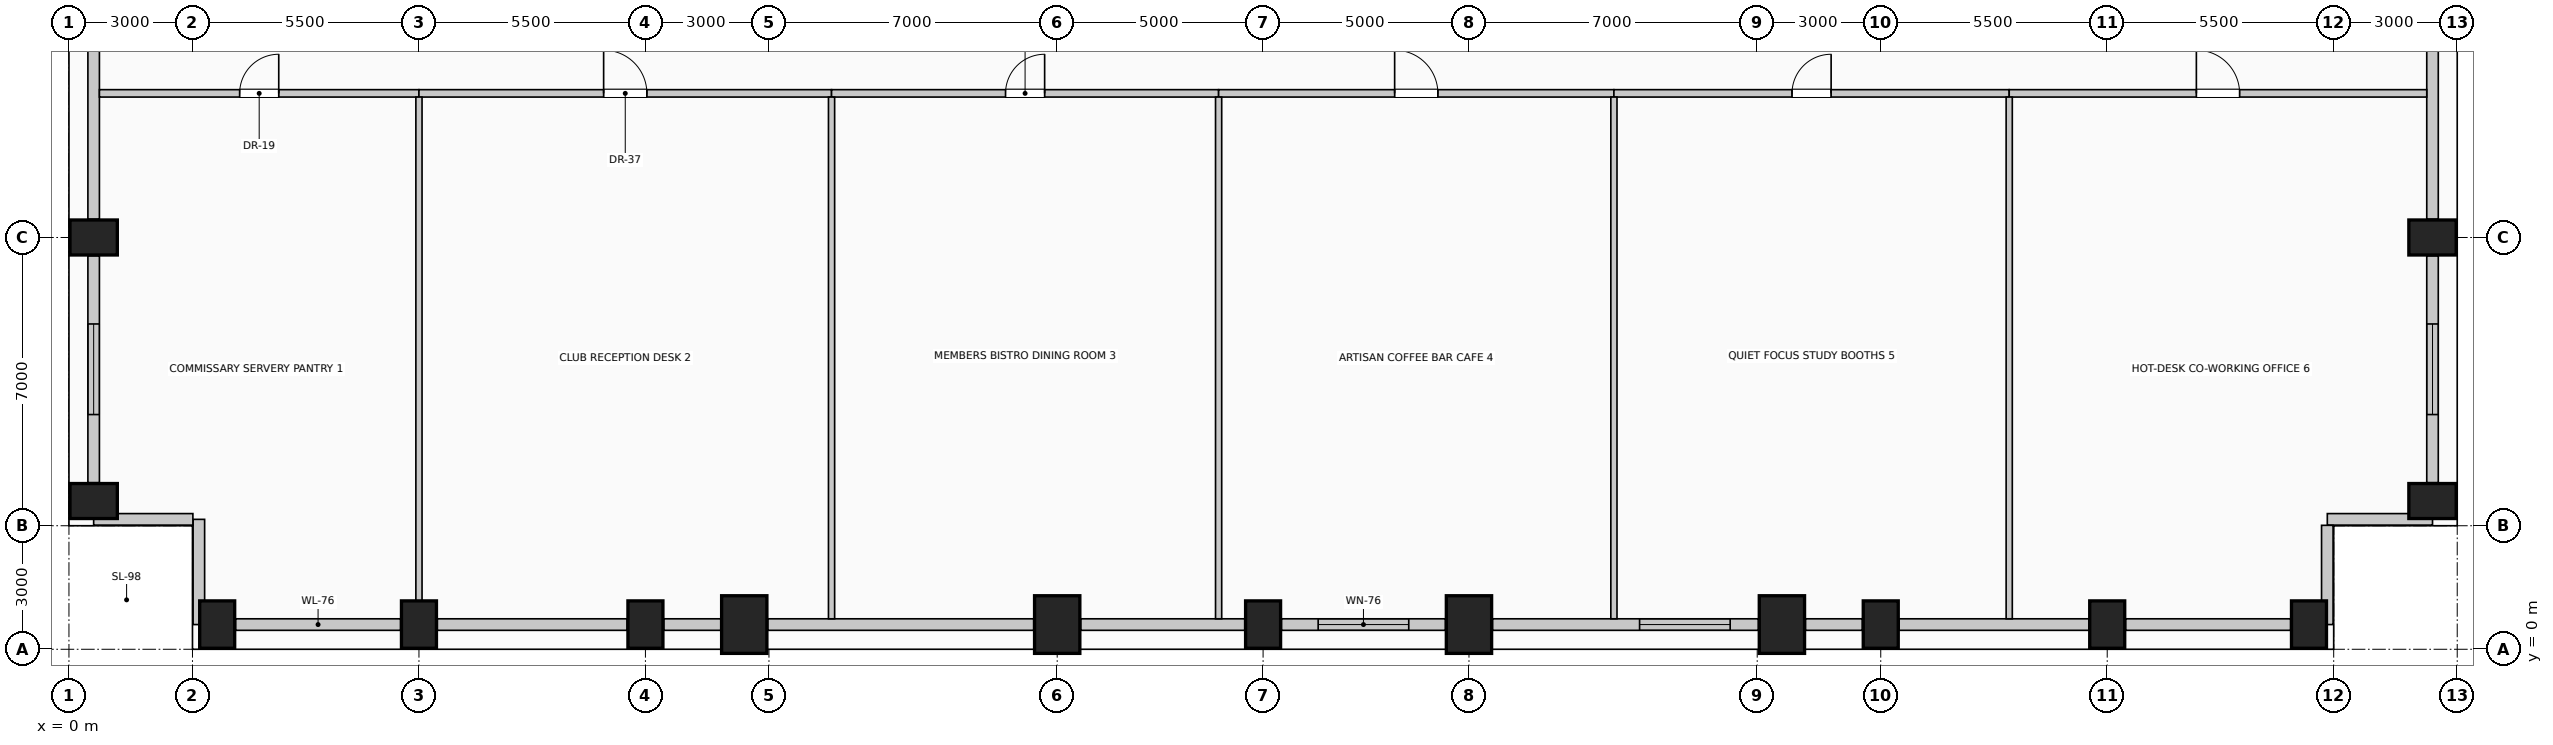
"""IFC4 building model, lengths in metres.
Left out: names, types, materials, properties, quantities, classifications, styles, units other than length and angle.
Written with IfcOpenShell. Run it as: python <this file> out.ifc"""

import sys

from ifc_helpers import new_model, si_unit, direction, frame, frame_2d, origin, origin_2d, place, context, subcontext, project, spatial, rectangle, extrude, element, fill, save


model = new_model("IFC4")
c1 = context("Model", 3, precision=1e-05, world=origin(), true_north=direction((0.0, 1.0)))
c2 = subcontext(c1, "Body", "Model", "MODEL_VIEW")
j1 = project(units=[si_unit("LENGTHUNIT", "METRE"), si_unit("PLANEANGLEUNIT", "RADIAN")], contexts=[c1])
p1 = place(None, origin())
s1 = spatial("IfcSite", under=j1, at=p1, CompositionType="ELEMENT")
p2 = place(p1, origin())
s2 = spatial("IfcBuilding", under=s1, at=p2, CompositionType="ELEMENT")
p3 = place(p2, frame((0.0, 0.0, 100.6)))
s3 = spatial("IfcBuildingStorey", under=s2, at=p3, CompositionType="ELEMENT", Elevation=100.6)
for number, where, z_axis, x_axis in (
    (1, (3.6, 0.6, 0.0), (0.0, 0.0, 1.0), (1.0, 0.0, 0.0)),
    (2, (8.5, 0.6, 0.0), (0.0, 0.0, 1.0), (1.0, 0.0, 0.0)),
    (3, (14.0, 0.6, 0.0), (0.0, 0.0, 1.0), (1.0, 0.0, 0.0)),
):
    element("IfcColumn", number, at=place(p3, frame(where, z_axis=z_axis, x_axis=x_axis)), inside=s3, PredefinedType="COLUMN", context=c2, shape_type="SweptSolid", body=[
        extrude(rectangle(XDim=0.85, YDim=1.15, at=origin_2d()), origin(), (0.0, 0.0, 1.0), 4.0),
    ])
for number, where, z_axis, x_axis in (
    (4, (16.4, 0.6, 0.0), (0.0, 0.0, 1.0), (1.0, 0.0, 0.0)),
    (5, (24.0, 0.6, 0.0), (0.0, 0.0, 1.0), (1.0, 0.0, 0.0)),
):
    element("IfcColumn", number, at=place(p3, frame(where, z_axis=z_axis, x_axis=x_axis)), inside=s3, PredefinedType="COLUMN", context=c2, shape_type="SweptSolid", body=[
        extrude(rectangle(XDim=1.1, YDim=1.4, at=origin_2d()), origin(), (0.0, 0.0, 1.0), 4.0),
    ])
p4 = place(p3, frame((29.0, 0.6, 0.0), z_axis=(0.0, 0.0, 1.0), x_axis=(1.0, 0.0, 0.0)))
e6 = element("IfcColumn", 6, at=p4, inside=s3, PredefinedType="COLUMN", context=c2, shape_type="SweptSolid", body=[
    extrude(rectangle(XDim=0.85, YDim=1.15, at=origin_2d()), origin(), (0.0, 0.0, 1.0), 4.0),
])
for number, where, z_axis, x_axis in (
    (7, (34.0, 0.6, 0.0), (0.0, 0.0, 1.0), (1.0, 0.0, 0.0)),
    (8, (41.6, 0.6, 0.0), (0.0, 0.0, 1.0), (1.0, 0.0, 0.0)),
):
    element("IfcColumn", number, at=place(p3, frame(where, z_axis=z_axis, x_axis=x_axis)), inside=s3, PredefinedType="COLUMN", context=c2, shape_type="SweptSolid", body=[
        extrude(rectangle(XDim=1.1, YDim=1.4, at=origin_2d()), origin(), (0.0, 0.0, 1.0), 4.0),
    ])
for number, where, z_axis, x_axis in (
    (9, (44.0, 0.6, 0.0), (0.0, 0.0, 1.0), (1.0, 0.0, 0.0)),
    (10, (49.5, 0.6, 0.0), (0.0, 0.0, 1.0), (1.0, 0.0, 0.0)),
    (11, (54.4, 0.6, 0.0), (0.0, 0.0, 1.0), (1.0, 0.0, 0.0)),
    (12, (0.6, 3.6, 0.0), (0.0, 0.0, 1.0), (0.0, 1.0, 0.0)),
    (13, (57.4, 3.6, 0.0), (0.0, 0.0, 1.0), (0.0, 1.0, 0.0)),
    (14, (0.6, 10.0, 0.0), (0.0, 0.0, 1.0), (0.0, 1.0, 0.0)),
    (15, (57.4, 10.0, 0.0), (0.0, 0.0, 1.0), (0.0, 1.0, 0.0)),
):
    element("IfcColumn", number, at=place(p3, frame(where, z_axis=z_axis, x_axis=x_axis)), inside=s3, PredefinedType="COLUMN", context=c2, shape_type="SweptSolid", body=[
        extrude(rectangle(XDim=0.85, YDim=1.15, at=origin_2d()), origin(), (0.0, 0.0, 1.0), 4.0),
    ])
p5 = place(p3, frame((8.055, 0.6, 0.0), z_axis=(0.0, 0.0, 1.0), x_axis=(-1.0, 0.0, 0.0)))
e16 = element("IfcWall", 16, at=p5, inside=s3, PredefinedType="SOLIDWALL", context=c2, shape_type="SweptSolid", body=[
    extrude(rectangle(XDim=4.01, YDim=0.28, at=frame_2d((2.005, 0.0))), origin(), (0.0, 0.0, 1.0), 2.875),
])
p6 = place(p3, frame((13.555, 0.6, 0.0), z_axis=(0.0, 0.0, 1.0), x_axis=(-1.0, 0.0, 0.0)))
e17 = element("IfcWall", 17, at=p6, inside=s3, PredefinedType="SOLIDWALL", context=c2, shape_type="SweptSolid", body=[
    extrude(rectangle(XDim=4.61, YDim=0.28, at=frame_2d((2.305, 0.0))), origin(), (0.0, 0.0, 1.0), 2.875),
])
p7 = place(p3, frame((15.83, 0.6, 0.0), z_axis=(0.0, 0.0, 1.0), x_axis=(-1.0, 0.0, 0.0)))
e18 = element("IfcWall", 18, at=p7, inside=s3, PredefinedType="SOLIDWALL", context=c2, shape_type="SweptSolid", body=[
    extrude(rectangle(XDim=1.385, YDim=0.28, at=frame_2d((0.692, 0.0))), origin(), (0.0, 0.0, 1.0), 2.875),
])
p8 = place(p3, frame((23.43, 0.6, 0.0), z_axis=(0.0, 0.0, 1.0), x_axis=(-1.0, 0.0, 0.0)))
e19 = element("IfcWall", 19, at=p8, inside=s3, PredefinedType="SOLIDWALL", context=c2, shape_type="SweptSolid", body=[
    extrude(rectangle(XDim=6.46, YDim=0.28, at=frame_2d((3.23, 0.0))), origin(), (0.0, 0.0, 1.0), 2.875),
])
p9 = place(p3, frame((28.555, 0.6, 0.0), z_axis=(0.0, 0.0, 1.0), x_axis=(-1.0, 0.0, 0.0)))
e20 = element("IfcWall", 20, at=p9, inside=s3, PredefinedType="SOLIDWALL", context=c2, shape_type="SweptSolid", body=[
    extrude(rectangle(XDim=3.985, YDim=0.28, at=frame_2d((1.992, 0.0))), origin(), (0.0, 0.0, 1.0), 2.875),
])
p10 = place(p3, frame((33.43, 0.6, 0.0), z_axis=(0.0, 0.0, 1.0), x_axis=(-1.0, 0.0, 0.0)))
e21 = element("IfcWall", 21, at=p10, inside=s3, PredefinedType="SOLIDWALL", context=c2, shape_type="SweptSolid", body=[
    extrude(rectangle(XDim=3.985, YDim=0.28, at=frame_2d((1.992, 0.0))), origin(), (0.0, 0.0, 1.0), 2.875),
])
p11 = place(p10, frame((0.893, 0.0, 0.5)))
e22 = element("IfcOpeningElement", 22, at=p11, cuts=e21, PredefinedType="OPENING", context=c2, shape_type="SweptSolid", body=[
    extrude(rectangle(XDim=2.2, YDim=1.95, at=frame_2d((1.1, 0.975))), frame((0.0, 0.15, 0.0), z_axis=(0.0, -1.0, 0.0), x_axis=(1.0, 0.0, 0.0)), (0.0, 0.0, 1.0), 0.3),
])
p12 = place(p3, frame((41.03, 0.6, 0.0), z_axis=(0.0, 0.0, 1.0), x_axis=(-1.0, 0.0, 0.0)))
e23 = element("IfcWall", 23, at=p12, inside=s3, PredefinedType="SOLIDWALL", context=c2, shape_type="SweptSolid", body=[
    extrude(rectangle(XDim=6.46, YDim=0.28, at=frame_2d((3.23, 0.0))), origin(), (0.0, 0.0, 1.0), 2.875),
])
p13 = place(p12, frame((0.687, 0.0, 0.5)))
e24 = element("IfcOpeningElement", 24, at=p13, cuts=e23, PredefinedType="OPENING", context=c2, shape_type="SweptSolid", body=[
    extrude(rectangle(XDim=2.2, YDim=1.95, at=frame_2d((1.1, 0.975))), frame((0.0, 0.15, 0.0), z_axis=(0.0, -1.0, 0.0), x_axis=(1.0, 0.0, 0.0)), (0.0, 0.0, 1.0), 0.3),
])
p14 = place(p3, frame((43.555, 0.6, 0.0), z_axis=(0.0, 0.0, 1.0), x_axis=(-1.0, 0.0, 0.0)))
e25 = element("IfcWall", 25, at=p14, inside=s3, PredefinedType="SOLIDWALL", context=c2, shape_type="SweptSolid", body=[
    extrude(rectangle(XDim=1.385, YDim=0.28, at=frame_2d((0.692, 0.0))), origin(), (0.0, 0.0, 1.0), 2.875),
])
p15 = place(p3, frame((49.055, 0.6, 0.0), z_axis=(0.0, 0.0, 1.0), x_axis=(-1.0, 0.0, 0.0)))
e26 = element("IfcWall", 26, at=p15, inside=s3, PredefinedType="SOLIDWALL", context=c2, shape_type="SweptSolid", body=[
    extrude(rectangle(XDim=4.61, YDim=0.28, at=frame_2d((2.305, 0.0))), origin(), (0.0, 0.0, 1.0), 2.875),
])
p16 = place(p3, frame((53.955, 0.6, 0.0), z_axis=(0.0, 0.0, 1.0), x_axis=(-1.0, 0.0, 0.0)))
e27 = element("IfcWall", 27, at=p16, inside=s3, PredefinedType="SOLIDWALL", context=c2, shape_type="SweptSolid", body=[
    extrude(rectangle(XDim=4.01, YDim=0.28, at=frame_2d((2.005, 0.0))), origin(), (0.0, 0.0, 1.0), 2.875),
])
p17 = place(p3, frame((0.6, 4.045, 0.0), z_axis=(0.0, 0.0, 1.0), x_axis=(0.0, 1.0, 0.0)))
e28 = element("IfcWall", 28, at=p17, inside=s3, PredefinedType="SOLIDWALL", context=c2, shape_type="SweptSolid", body=[
    extrude(rectangle(XDim=5.51, YDim=0.28, at=frame_2d((2.755, 0.0))), origin(), (0.0, 0.0, 1.0), 2.875),
])
p18 = place(p17, frame((1.655, 0.0, 0.5)))
e29 = element("IfcOpeningElement", 29, at=p18, cuts=e28, PredefinedType="OPENING", context=c2, shape_type="SweptSolid", body=[
    extrude(rectangle(XDim=2.2, YDim=1.95, at=frame_2d((1.1, 0.975))), frame((0.0, 0.15, 0.0), z_axis=(0.0, -1.0, 0.0), x_axis=(1.0, 0.0, 0.0)), (0.0, 0.0, 1.0), 0.3),
])
p19 = place(p3, frame((0.6, 10.445, 0.0), z_axis=(0.0, 0.0, 1.0), x_axis=(0.0, 1.0, 0.0)))
e30 = element("IfcWall", 30, at=p19, inside=s3, PredefinedType="SOLIDWALL", context=c2, shape_type="SweptSolid", body=[
    extrude(rectangle(XDim=7.11, YDim=0.28, at=frame_2d((3.555, 0.0))), origin(), (0.0, 0.0, 1.0), 2.875),
])
p20 = place(p3, frame((57.4, 9.555, 0.0), z_axis=(0.0, 0.0, 1.0), x_axis=(0.0, -1.0, 0.0)))
e31 = element("IfcWall", 31, at=p20, inside=s3, PredefinedType="SOLIDWALL", context=c2, shape_type="SweptSolid", body=[
    extrude(rectangle(XDim=5.51, YDim=0.28, at=frame_2d((2.755, 0.0))), origin(), (0.0, 0.0, 1.0), 2.875),
])
p21 = place(p20, frame((1.655, 0.0, 0.5)))
e32 = element("IfcOpeningElement", 32, at=p21, cuts=e31, PredefinedType="OPENING", context=c2, shape_type="SweptSolid", body=[
    extrude(rectangle(XDim=2.2, YDim=1.95, at=frame_2d((1.1, 0.975))), frame((0.0, 0.15, 0.0), z_axis=(0.0, -1.0, 0.0), x_axis=(1.0, 0.0, 0.0)), (0.0, 0.0, 1.0), 0.3),
])
p22 = place(p3, frame((57.4, 17.555, 0.0), z_axis=(0.0, 0.0, 1.0), x_axis=(0.0, -1.0, 0.0)))
e33 = element("IfcWall", 33, at=p22, inside=s3, PredefinedType="SOLIDWALL", context=c2, shape_type="SweptSolid", body=[
    extrude(rectangle(XDim=7.11, YDim=0.28, at=frame_2d((3.555, 0.0))), origin(), (0.0, 0.0, 1.0), 2.875),
])
p23 = place(p3, frame((57.4, 3.155, 0.0), z_axis=(0.0, 0.0, 1.0), x_axis=(-1.0, 0.0, 0.0)))
e34 = element("IfcWall", 34, at=p23, inside=s3, PredefinedType="SOLIDWALL", context=c2, shape_type="SweptSolid", body=[
    extrude(rectangle(XDim=2.555, YDim=0.28, at=frame_2d((1.277, 0.0))), origin(), (0.0, 0.0, 1.0), 3.725),
])
p24 = place(p3, frame((54.845, 3.01, 0.0), z_axis=(0.0, 0.0, 1.0), x_axis=(0.0, -1.0, 0.0)))
e35 = element("IfcWall", 35, at=p24, inside=s3, PredefinedType="SOLIDWALL", context=c2, shape_type="SweptSolid", body=[
    extrude(rectangle(XDim=2.41, YDim=0.28, at=frame_2d((1.205, 0.0))), origin(), (0.0, 0.0, 1.0), 3.725),
])
p25 = place(p3, frame((3.155, 0.6, 0.0), z_axis=(0.0, 0.0, 1.0), x_axis=(0.0, 1.0, 0.0)))
e36 = element("IfcWall", 36, at=p25, inside=s3, PredefinedType="SOLIDWALL", context=c2, shape_type="SweptSolid", body=[
    extrude(rectangle(XDim=2.555, YDim=0.28, at=frame_2d((1.277, 0.0))), origin(), (0.0, 0.0, 1.0), 3.725),
])
p26 = place(p3, frame((3.01, 3.155, 0.0), z_axis=(0.0, 0.0, 1.0), x_axis=(-1.0, 0.0, 0.0)))
e37 = element("IfcWall", 37, at=p26, inside=s3, PredefinedType="SOLIDWALL", context=c2, shape_type="SweptSolid", body=[
    extrude(rectangle(XDim=2.41, YDim=0.28, at=frame_2d((1.205, 0.0))), origin(), (0.0, 0.0, 1.0), 3.725),
])
p27 = place(p3, frame((0.74, 13.5, 0.0), z_axis=(0.0, 0.0, 1.0), x_axis=(1.0, 0.0, 0.0)))
e38 = element("IfcWall", 38, at=p27, inside=s3, PredefinedType="PARTITIONING", context=c2, shape_type="SweptSolid", body=[
    extrude(rectangle(XDim=7.76, YDim=0.18, at=frame_2d((3.88, 0.0))), origin(), (0.0, 0.0, 1.0), 3.725),
])
p28 = place(p27, frame((3.405, 0.0, 0.0)))
e39 = element("IfcOpeningElement", 39, at=p28, cuts=e38, PredefinedType="OPENING", context=c2, shape_type="SweptSolid", body=[
    extrude(rectangle(XDim=0.95, YDim=2.15, at=frame_2d((0.475, 1.075))), frame((0.0, 0.1, 0.0), z_axis=(0.0, -1.0, 0.0), x_axis=(1.0, 0.0, 0.0)), (0.0, 0.0, 1.0), 0.2),
])
p29 = place(p3, frame((8.5, 13.5, 0.0), z_axis=(0.0, 0.0, 1.0), x_axis=(1.0, 0.0, 0.0)))
e40 = element("IfcWall", 40, at=p29, inside=s3, PredefinedType="PARTITIONING", context=c2, shape_type="SweptSolid", body=[
    extrude(rectangle(XDim=10.02, YDim=0.18, at=frame_2d((5.01, 0.0))), origin(), (0.0, 0.0, 1.0), 3.725),
])
p30 = place(p29, frame((4.485, 0.0, 0.0)))
e41 = element("IfcOpeningElement", 41, at=p30, cuts=e40, PredefinedType="OPENING", context=c2, shape_type="SweptSolid", body=[
    extrude(rectangle(XDim=1.05, YDim=2.15, at=frame_2d((0.525, 1.075))), frame((0.0, 0.1, 0.0), z_axis=(0.0, -1.0, 0.0), x_axis=(1.0, 0.0, 0.0)), (0.0, 0.0, 1.0), 0.2),
])
p31 = place(p3, frame((18.52, 13.5, 0.0), z_axis=(0.0, 0.0, 1.0), x_axis=(1.0, 0.0, 0.0)))
e42 = element("IfcWall", 42, at=p31, inside=s3, PredefinedType="PARTITIONING", context=c2, shape_type="SweptSolid", body=[
    extrude(rectangle(XDim=9.4, YDim=0.18, at=frame_2d((4.7, 0.0))), origin(), (0.0, 0.0, 1.0), 3.725),
])
p32 = place(p31, frame((4.225, 0.0, 0.0)))
e43 = element("IfcOpeningElement", 43, at=p32, cuts=e42, PredefinedType="OPENING", context=c2, shape_type="SweptSolid", body=[
    extrude(rectangle(XDim=0.95, YDim=2.15, at=frame_2d((0.475, 1.075))), frame((0.0, 0.1, 0.0), z_axis=(0.0, -1.0, 0.0), x_axis=(1.0, 0.0, 0.0)), (0.0, 0.0, 1.0), 0.2),
])
p33 = place(p3, frame((27.92, 13.5, 0.0), z_axis=(0.0, 0.0, 1.0), x_axis=(1.0, 0.0, 0.0)))
e44 = element("IfcWall", 44, at=p33, inside=s3, PredefinedType="PARTITIONING", context=c2, shape_type="SweptSolid", body=[
    extrude(rectangle(XDim=9.6, YDim=0.18, at=frame_2d((4.8, 0.0))), origin(), (0.0, 0.0, 1.0), 3.725),
])
p34 = place(p33, frame((4.275, 0.0, 0.0)))
e45 = element("IfcOpeningElement", 45, at=p34, cuts=e44, PredefinedType="OPENING", context=c2, shape_type="SweptSolid", body=[
    extrude(rectangle(XDim=1.05, YDim=2.15, at=frame_2d((0.525, 1.075))), frame((0.0, 0.1, 0.0), z_axis=(0.0, -1.0, 0.0), x_axis=(1.0, 0.0, 0.0)), (0.0, 0.0, 1.0), 0.2),
])
p35 = place(p3, frame((37.52, 13.5, 0.0), z_axis=(0.0, 0.0, 1.0), x_axis=(1.0, 0.0, 0.0)))
e46 = element("IfcWall", 46, at=p35, inside=s3, PredefinedType="PARTITIONING", context=c2, shape_type="SweptSolid", body=[
    extrude(rectangle(XDim=9.6, YDim=0.18, at=frame_2d((4.8, 0.0))), origin(), (0.0, 0.0, 1.0), 3.725),
])
p36 = place(p35, frame((4.325, 0.0, 0.0)))
e47 = element("IfcOpeningElement", 47, at=p36, cuts=e46, PredefinedType="OPENING", context=c2, shape_type="SweptSolid", body=[
    extrude(rectangle(XDim=0.95, YDim=2.15, at=frame_2d((0.475, 1.075))), frame((0.0, 0.1, 0.0), z_axis=(0.0, -1.0, 0.0), x_axis=(1.0, 0.0, 0.0)), (0.0, 0.0, 1.0), 0.2),
])
p37 = place(p3, frame((47.12, 13.5, 0.0), z_axis=(0.0, 0.0, 1.0), x_axis=(1.0, 0.0, 0.0)))
e48 = element("IfcWall", 48, at=p37, inside=s3, PredefinedType="PARTITIONING", context=c2, shape_type="SweptSolid", body=[
    extrude(rectangle(XDim=10.14, YDim=0.18, at=frame_2d((5.07, 0.0))), origin(), (0.0, 0.0, 1.0), 3.725),
])
p38 = place(p37, frame((4.545, 0.0, 0.0)))
e49 = element("IfcOpeningElement", 49, at=p38, cuts=e48, PredefinedType="OPENING", context=c2, shape_type="SweptSolid", body=[
    extrude(rectangle(XDim=1.05, YDim=2.15, at=frame_2d((0.525, 1.075))), frame((0.0, 0.1, 0.0), z_axis=(0.0, -1.0, 0.0), x_axis=(1.0, 0.0, 0.0)), (0.0, 0.0, 1.0), 0.2),
])
p39 = place(p3, frame((8.5, 1.175, 0.0), z_axis=(0.0, 0.0, 1.0), x_axis=(0.0, 1.0, 0.0)))
e50 = element("IfcWall", 50, at=p39, inside=s3, PredefinedType="PARTITIONING", context=c2, shape_type="SweptSolid", body=[
    extrude(rectangle(XDim=12.235, YDim=0.15, at=frame_2d((6.117, 0.0))), origin(), (0.0, 0.0, 1.0), 3.725),
])
for number, where, z_axis, x_axis in (
    (51, (18.52, 0.74, 0.0), (0.0, 0.0, 1.0), (0.0, 1.0, 0.0)),
    (52, (27.92, 0.74, 0.0), (0.0, 0.0, 1.0), (0.0, 1.0, 0.0)),
    (53, (37.52, 0.74, 0.0), (0.0, 0.0, 1.0), (0.0, 1.0, 0.0)),
    (54, (47.12, 0.74, 0.0), (0.0, 0.0, 1.0), (0.0, 1.0, 0.0)),
):
    element("IfcWall", number, at=place(p3, frame(where, z_axis=z_axis, x_axis=x_axis)), inside=s3, PredefinedType="PARTITIONING", context=c2, shape_type="SweptSolid", body=[
        extrude(rectangle(XDim=12.67, YDim=0.15, at=frame_2d((6.335, 0.0))), origin(), (0.0, 0.0, 1.0), 3.725),
    ])
p40 = place(p11, origin())
e55 = element("IfcWindow", 55, at=p40, inside=s3, PartitioningType="SINGLE_PANEL", PredefinedType="WINDOW", context=c2, shape_type="SweptSolid", body=[
    extrude(rectangle(XDim=2.2, YDim=1.95, at=frame_2d((1.1, 0.975))), frame((0.0, 0.03, 0.0), z_axis=(0.0, -1.0, 0.0), x_axis=(1.0, 0.0, 0.0)), (0.0, 0.0, 1.0), 0.06),
])
fill(e22, e55)
p41 = place(p13, origin())
e56 = element("IfcWindow", 56, at=p41, inside=s3, PartitioningType="SINGLE_PANEL", PredefinedType="WINDOW", context=c2, shape_type="SweptSolid", body=[
    extrude(rectangle(XDim=2.2, YDim=1.95, at=frame_2d((1.1, 0.975))), frame((0.0, 0.03, 0.0), z_axis=(0.0, -1.0, 0.0), x_axis=(1.0, 0.0, 0.0)), (0.0, 0.0, 1.0), 0.06),
])
fill(e24, e56)
p42 = place(p18, origin())
e57 = element("IfcWindow", 57, at=p42, inside=s3, PartitioningType="SINGLE_PANEL", PredefinedType="WINDOW", context=c2, shape_type="SweptSolid", body=[
    extrude(rectangle(XDim=2.2, YDim=1.95, at=frame_2d((1.1, 0.975))), frame((0.0, 0.03, 0.0), z_axis=(0.0, -1.0, 0.0), x_axis=(1.0, 0.0, 0.0)), (0.0, 0.0, 1.0), 0.06),
])
fill(e29, e57)
p43 = place(p21, origin())
e58 = element("IfcWindow", 58, at=p43, inside=s3, PartitioningType="SINGLE_PANEL", PredefinedType="WINDOW", context=c2, shape_type="SweptSolid", body=[
    extrude(rectangle(XDim=2.2, YDim=1.95, at=frame_2d((1.1, 0.975))), frame((0.0, 0.03, 0.0), z_axis=(0.0, -1.0, 0.0), x_axis=(1.0, 0.0, 0.0)), (0.0, 0.0, 1.0), 0.06),
])
fill(e32, e58)
p44 = place(p28, origin())
e59 = element("IfcDoor", 59, at=p44, inside=s3, OperationType="SINGLE_SWING_RIGHT", PredefinedType="DOOR", context=c2, shape_type="SweptSolid", body=[
    extrude(rectangle(XDim=0.95, YDim=2.15, at=frame_2d((0.475, 1.075))), frame((0.0, 0.025, 0.0), z_axis=(0.0, -1.0, 0.0), x_axis=(1.0, 0.0, 0.0)), (0.0, 0.0, 1.0), 0.05),
])
fill(e39, e59)
p45 = place(p30, origin())
e60 = element("IfcDoor", 60, at=p45, inside=s3, OperationType="SINGLE_SWING_LEFT", PredefinedType="DOOR", context=c2, shape_type="SweptSolid", body=[
    extrude(rectangle(XDim=1.05, YDim=2.15, at=frame_2d((0.525, 1.075))), frame((0.0, 0.025, 0.0), z_axis=(0.0, -1.0, 0.0), x_axis=(1.0, 0.0, 0.0)), (0.0, 0.0, 1.0), 0.05),
])
fill(e41, e60)
p46 = place(p32, origin())
e61 = element("IfcDoor", 61, at=p46, inside=s3, OperationType="SINGLE_SWING_RIGHT", PredefinedType="DOOR", context=c2, shape_type="SweptSolid", body=[
    extrude(rectangle(XDim=0.95, YDim=2.15, at=frame_2d((0.475, 1.075))), frame((0.0, 0.025, 0.0), z_axis=(0.0, -1.0, 0.0), x_axis=(1.0, 0.0, 0.0)), (0.0, 0.0, 1.0), 0.05),
])
fill(e43, e61)
p47 = place(p34, origin())
e62 = element("IfcDoor", 62, at=p47, inside=s3, OperationType="SINGLE_SWING_LEFT", PredefinedType="DOOR", context=c2, shape_type="SweptSolid", body=[
    extrude(rectangle(XDim=1.05, YDim=2.15, at=frame_2d((0.525, 1.075))), frame((0.0, 0.025, 0.0), z_axis=(0.0, -1.0, 0.0), x_axis=(1.0, 0.0, 0.0)), (0.0, 0.0, 1.0), 0.05),
])
fill(e45, e62)
p48 = place(p36, origin())
e63 = element("IfcDoor", 63, at=p48, inside=s3, OperationType="SINGLE_SWING_RIGHT", PredefinedType="DOOR", context=c2, shape_type="SweptSolid", body=[
    extrude(rectangle(XDim=0.95, YDim=2.15, at=frame_2d((0.475, 1.075))), frame((0.0, 0.025, 0.0), z_axis=(0.0, -1.0, 0.0), x_axis=(1.0, 0.0, 0.0)), (0.0, 0.0, 1.0), 0.05),
])
fill(e47, e63)
p49 = place(p38, origin())
e64 = element("IfcDoor", 64, at=p49, inside=s3, OperationType="SINGLE_SWING_LEFT", PredefinedType="DOOR", context=c2, shape_type="SweptSolid", body=[
    extrude(rectangle(XDim=1.05, YDim=2.15, at=frame_2d((0.525, 1.075))), frame((0.0, 0.025, 0.0), z_axis=(0.0, -1.0, 0.0), x_axis=(1.0, 0.0, 0.0)), (0.0, 0.0, 1.0), 0.05),
])
fill(e49, e64)
save(model, sys.argv[1])
